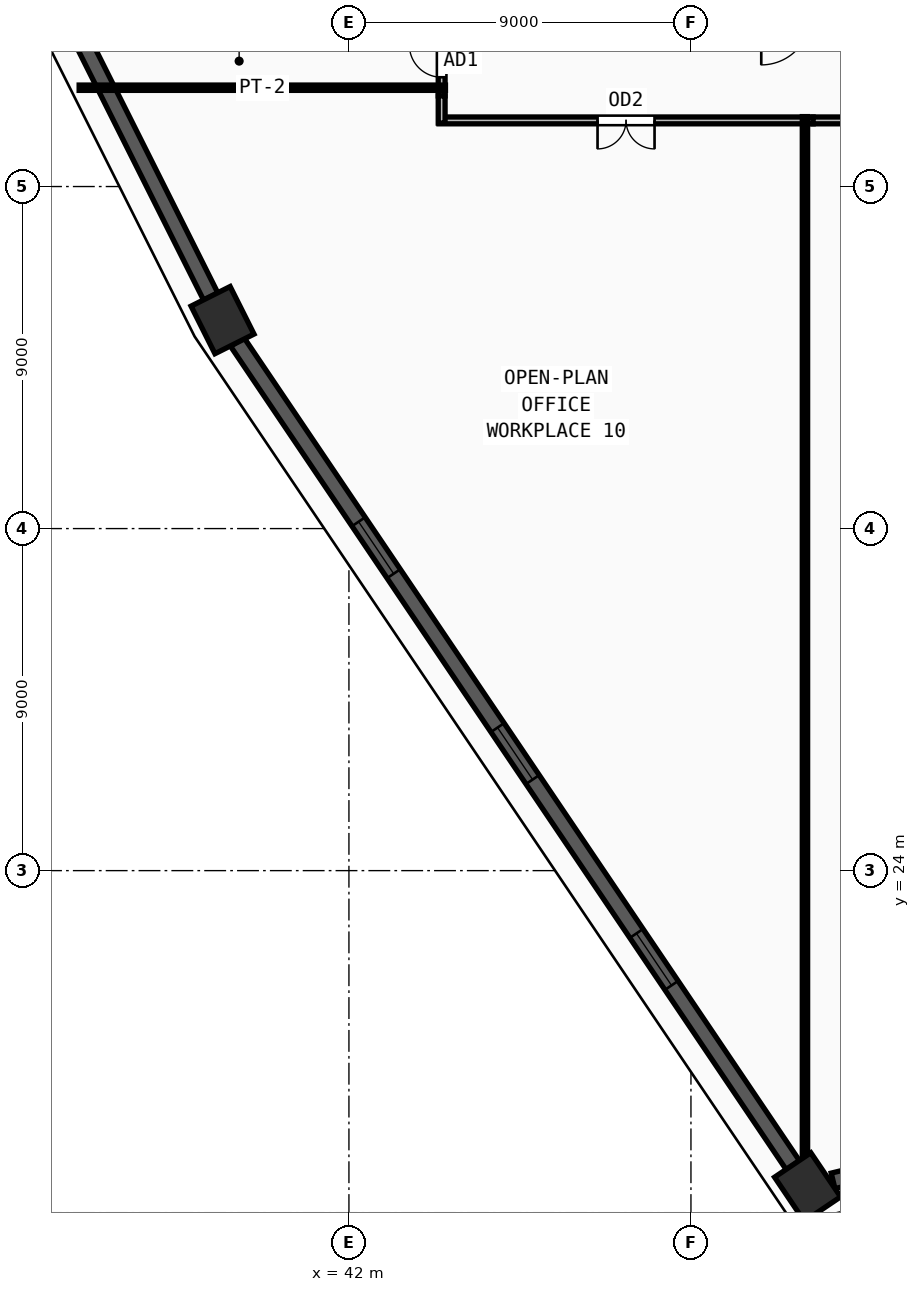
"""IFC4 building model, lengths in metres.
Left out: names, types, materials, properties, quantities, classifications, styles, units other than length and angle.
Written with IfcOpenShell. Run it as: python <this file> out.ifc"""

import sys

from ifc_helpers import new_model, si_unit, direction, frame, frame_2d, origin, origin_2d, place, context, subcontext, project, spatial, rectangle, extrude, source, transform, mapped, element, fill, save


model = new_model("IFC4")
c1 = context("Model", 3, precision=1e-05, world=origin(), true_north=direction((0.0, 1.0)))
c2 = subcontext(c1, "Body", "Model", "MODEL_VIEW")
j1 = project(units=[si_unit("LENGTHUNIT", "METRE"), si_unit("PLANEANGLEUNIT", "RADIAN")], contexts=[c1])
p1 = place(None, origin())
s1 = spatial("IfcSite", under=j1, at=p1, CompositionType="ELEMENT")
p2 = place(p1, origin())
s2 = spatial("IfcBuilding", under=s1, at=p2, CompositionType="ELEMENT")
p3 = place(p2, frame((0.0, 0.0, 124.5)))
s3 = spatial("IfcBuildingStorey", under=s2, at=p3, CompositionType="ELEMENT", Elevation=124.5)
m1 = source(origin(), c2, "Body", "SweptSolid", [
    extrude(rectangle(XDim=1.4, YDim=1.15, at=origin_2d()), origin(), (0.0, 0.0, 1.0), 3.75),
])
for number, where, z_axis, x_axis in (
    (1, (54.069, 15.675, 0.0), (0.0, 0.0, 1.0), (-0.559, 0.829, 0.0)),
    (2, (38.674, 38.485, 0.0), (0.0, 0.0, 1.0), (-0.449, 0.894, 0.0)),
):
    element("IfcColumn", number, at=place(p3, frame(where, z_axis=z_axis, x_axis=x_axis)), inside=s3, PredefinedType="COLUMN", context=c2, shape_type="MappedRepresentation", body=[
        mapped(m1, transform((0.0, 0.0, 0.0), x_axis=(1.0, 0.0, 0.0), y_axis=(0.0, 1.0, 0.0), z_axis=(0.0, 0.0, 1.0), scale=1.0)),
    ])
p4 = place(p3, frame((24.158, 67.415, 0.0), z_axis=(0.0, 0.0, 1.0), x_axis=(0.448489429893, -0.893788135564, 0.0)))
e3 = element("IfcWall", 3, at=p4, inside=s3, PredefinedType="SOLIDWALL", context=c2, shape_type="SweptSolid", body=[
    extrude(rectangle(XDim=31.677, YDim=0.42, at=frame_2d((15.839, 0.0))), origin(), (0.0, 0.0, 1.0), 3.57),
])
m2 = source(origin(), c2, "Body", "SweptSolid", [
    extrude(rectangle(XDim=1.65, YDim=1.95, at=frame_2d((0.825, 0.975))), frame((0.0, 0.22, 0.0), z_axis=(0.0, -1.0, 0.0), x_axis=(1.0, 0.0, 0.0)), (0.0, 0.0, 1.0), 0.44),
])
p5 = place(p4, frame((7.094, 0.0, 0.55)))
e4 = element("IfcOpeningElement", 4, at=p5, cuts=e3, PredefinedType="OPENING", context=c2, shape_type="MappedRepresentation", body=[
    mapped(m2, transform((0.0, 0.0, 0.0), x_axis=(1.0, 0.0, 0.0), y_axis=(0.0, 1.0, 0.0), z_axis=(0.0, 0.0, 1.0), scale=1.0)),
])
p6 = place(p4, frame((16.564, 0.0, 0.55)))
e5 = element("IfcOpeningElement", 5, at=p6, cuts=e3, PredefinedType="OPENING", context=c2, shape_type="MappedRepresentation", body=[
    mapped(m2, transform((0.0, 0.0, 0.0), x_axis=(1.0, 0.0, 0.0), y_axis=(0.0, 1.0, 0.0), z_axis=(0.0, 0.0, 1.0), scale=1.0)),
])
p7 = place(p4, frame((21.383, 0.0, 0.55)))
e6 = element("IfcOpeningElement", 6, at=p7, cuts=e3, PredefinedType="OPENING", context=c2, shape_type="MappedRepresentation", body=[
    mapped(m2, transform((0.0, 0.0, 0.0), x_axis=(1.0, 0.0, 0.0), y_axis=(0.0, 1.0, 0.0), z_axis=(0.0, 0.0, 1.0), scale=1.0)),
])
p8 = place(p3, frame((39.06, 37.913, 0.0), z_axis=(0.0, 0.0, 1.0), x_axis=(0.559433071817, -0.828875526335, 0.0)))
e7 = element("IfcWall", 7, at=p8, inside=s3, PredefinedType="SOLIDWALL", context=c2, shape_type="SweptSolid", body=[
    extrude(rectangle(XDim=26.139, YDim=0.42, at=frame_2d((13.07, 0.0))), origin(), (0.0, 0.0, 1.0), 3.57),
])
p9 = place(p8, frame((5.71, 0.0, 0.55)))
e8 = element("IfcOpeningElement", 8, at=p9, cuts=e7, PredefinedType="OPENING", context=c2, shape_type="MappedRepresentation", body=[
    mapped(m2, transform((0.0, 0.0, 0.0), x_axis=(1.0, 0.0, 0.0), y_axis=(0.0, 1.0, 0.0), z_axis=(0.0, 0.0, 1.0), scale=1.0)),
])
p10 = place(p8, frame((12.245, 0.0, 0.55)))
e9 = element("IfcOpeningElement", 9, at=p10, cuts=e7, PredefinedType="OPENING", context=c2, shape_type="MappedRepresentation", body=[
    mapped(m2, transform((0.0, 0.0, 0.0), x_axis=(1.0, 0.0, 0.0), y_axis=(0.0, 1.0, 0.0), z_axis=(0.0, 0.0, 1.0), scale=1.0)),
])
p11 = place(p8, frame((18.779, 0.0, 0.55)))
e10 = element("IfcOpeningElement", 10, at=p11, cuts=e7, PredefinedType="OPENING", context=c2, shape_type="MappedRepresentation", body=[
    mapped(m2, transform((0.0, 0.0, 0.0), x_axis=(1.0, 0.0, 0.0), y_axis=(0.0, 1.0, 0.0), z_axis=(0.0, 0.0, 1.0), scale=1.0)),
])
p12 = place(p3, frame((54.74, 15.837, 0.0), z_axis=(0.0, 0.0, 1.0), x_axis=(0.972061054332, 0.234728154791, 0.0)))
e11 = element("IfcWall", 11, at=p12, inside=s3, PredefinedType="SOLIDWALL", context=c2, shape_type="SweptSolid", body=[
    extrude(rectangle(XDim=4.721, YDim=0.42, at=frame_2d((2.36, 0.0))), origin(), (0.0, 0.0, 1.0), 3.57),
])
m3 = source(origin(), c2, "Body", "SweptSolid", [
    extrude(rectangle(XDim=1.2, YDim=1.9, at=frame_2d((0.6, 0.95))), frame((0.0, 0.22, 0.0), z_axis=(0.0, -1.0, 0.0), x_axis=(1.0, 0.0, 0.0)), (0.0, 0.0, 1.0), 0.44),
])
p13 = place(p12, frame((1.76, 0.0, 0.55)))
e12 = element("IfcOpeningElement", 12, at=p13, cuts=e11, PredefinedType="OPENING", context=c2, shape_type="MappedRepresentation", body=[
    mapped(m3, transform((0.0, 0.0, 0.0), x_axis=(1.0, 0.0, 0.0), y_axis=(0.0, 1.0, 0.0), z_axis=(0.0, 0.0, 1.0), scale=1.0)),
])
p14 = place(p3, frame((44.44, 44.385, 0.0), z_axis=(0.0, 0.0, 1.0), x_axis=(0.0, 1.0, 0.0)))
e13 = element("IfcWall", 13, at=p14, inside=s3, PredefinedType="PARTITIONING", context=c2, shape_type="SweptSolid", body=[
    extrude(rectangle(XDim=1.83, YDim=0.18, at=frame_2d((0.915, 0.0))), origin(), (0.0, 0.0, 1.0), 3.57),
])
m4 = source(origin(), c2, "Body", "SweptSolid", [
    extrude(rectangle(XDim=0.85, YDim=2.1, at=frame_2d((0.425, 1.05))), frame((0.0, 0.1, 0.0), z_axis=(0.0, -1.0, 0.0), x_axis=(1.0, 0.0, 0.0)), (0.0, 0.0, 1.0), 0.2),
])
p15 = place(p14, frame((0.49, 0.0, 0.0)))
e14 = element("IfcOpeningElement", 14, at=p15, cuts=e13, PredefinedType="OPENING", context=c2, shape_type="MappedRepresentation", body=[
    mapped(m4, transform((0.0, 0.0, 0.0), x_axis=(1.0, 0.0, 0.0), y_axis=(0.0, 1.0, 0.0), z_axis=(0.0, 0.0, 1.0), scale=1.0)),
])
p16 = place(p3, frame((54.215, 43.74, 0.0), z_axis=(0.0, 0.0, 1.0), x_axis=(-1.0, 0.0, 0.0)))
e15 = element("IfcWall", 15, at=p16, inside=s3, PredefinedType="PARTITIONING", context=c2, shape_type="SweptSolid", body=[
    extrude(rectangle(XDim=9.845, YDim=0.18, at=frame_2d((4.922, 0.0))), origin(), (0.0, 0.0, 1.0), 3.57),
])
m5 = source(origin(), c2, "Body", "SweptSolid", [
    extrude(rectangle(XDim=1.5, YDim=2.2, at=frame_2d((0.75, 1.1))), frame((0.0, 0.1, 0.0), z_axis=(0.0, -1.0, 0.0), x_axis=(1.0, 0.0, 0.0)), (0.0, 0.0, 1.0), 0.2),
])
p17 = place(p16, frame((4.173, 0.0, 0.0)))
e16 = element("IfcOpeningElement", 16, at=p17, cuts=e15, PredefinedType="OPENING", context=c2, shape_type="MappedRepresentation", body=[
    mapped(m5, transform((0.0, 0.0, 0.0), x_axis=(1.0, 0.0, 0.0), y_axis=(0.0, 1.0, 0.0), z_axis=(0.0, 0.0, 1.0), scale=1.0)),
])
p18 = place(p3, frame((65.215, 43.74, 0.0), z_axis=(0.0, 0.0, 1.0), x_axis=(-1.0, 0.0, 0.0)))
e17 = element("IfcWall", 17, at=p18, inside=s3, PredefinedType="PARTITIONING", context=c2, shape_type="SweptSolid", body=[
    extrude(rectangle(XDim=11.0, YDim=0.18, at=frame_2d((5.5, 0.0))), origin(), (0.0, 0.0, 1.0), 3.57),
])
p19 = place(p18, frame((9.275, 0.0, 0.0)))
e18 = element("IfcOpeningElement", 18, at=p19, cuts=e17, PredefinedType="OPENING", context=c2, shape_type="MappedRepresentation", body=[
    mapped(m4, transform((0.0, 0.0, 0.0), x_axis=(1.0, 0.0, 0.0), y_axis=(0.0, 1.0, 0.0), z_axis=(0.0, 0.0, 1.0), scale=1.0)),
])
p20 = place(p3, frame((44.44, 43.67, 0.0), z_axis=(0.0, 0.0, 1.0), x_axis=(0.0, 1.0, 0.0)))
e19 = element("IfcWall", 19, at=p20, inside=s3, PredefinedType="PARTITIONING", context=c2, shape_type="SweptSolid", body=[
    extrude(rectangle(XDim=0.715, YDim=0.18, at=frame_2d((0.357, 0.0))), origin(), (0.0, 0.0, 1.0), 3.57),
])
p21 = place(p3, frame((44.54, 44.6, 0.0), z_axis=(0.0, 0.0, 1.0), x_axis=(-1.0, 0.0, 0.0)))
e20 = element("IfcWall", 20, at=p21, inside=s3, PredefinedType="PARTITIONING", context=c2, shape_type="SweptSolid", body=[
    extrude(rectangle(XDim=9.639, YDim=0.14, at=frame_2d((4.82, 0.0))), origin(), (0.0, 0.0, 1.0), 3.57),
])
p22 = place(p3, frame((54.0, 43.84, 0.0), z_axis=(0.0, 0.0, 1.0), x_axis=(0.0, -1.0, 0.0)))
e21 = element("IfcWall", 21, at=p22, inside=s3, PredefinedType="PARTITIONING", context=c2, shape_type="SweptSolid", body=[
    extrude(rectangle(XDim=28.83, YDim=0.14, at=frame_2d((14.415, 0.0))), origin(), (0.0, 0.0, 1.0), 2.755),
])
m6 = source(origin(), c2, "Body", "SweptSolid", [
    extrude(rectangle(XDim=1.65, YDim=1.95, at=frame_2d((0.825, 0.975))), frame((0.0, 0.03, 0.0), z_axis=(0.0, -1.0, 0.0), x_axis=(1.0, 0.0, 0.0)), (0.0, 0.0, 1.0), 0.06),
])
p23 = place(p9, origin())
e22 = element("IfcWindow", 22, at=p23, inside=s3, PartitioningType="DOUBLE_PANEL_VERTICAL", PredefinedType="WINDOW", context=c2, shape_type="MappedRepresentation", body=[
    mapped(m6, transform((0.0, 0.0, 0.0), x_axis=(1.0, 0.0, 0.0), y_axis=(0.0, 1.0, 0.0), z_axis=(0.0, 0.0, 1.0), scale=1.0)),
])
fill(e8, e22)
p24 = place(p10, origin())
e23 = element("IfcWindow", 23, at=p24, inside=s3, PartitioningType="DOUBLE_PANEL_VERTICAL", PredefinedType="WINDOW", context=c2, shape_type="MappedRepresentation", body=[
    mapped(m6, transform((0.0, 0.0, 0.0), x_axis=(1.0, 0.0, 0.0), y_axis=(0.0, 1.0, 0.0), z_axis=(0.0, 0.0, 1.0), scale=1.0)),
])
fill(e9, e23)
p25 = place(p11, origin())
e24 = element("IfcWindow", 24, at=p25, inside=s3, PartitioningType="DOUBLE_PANEL_VERTICAL", PredefinedType="WINDOW", context=c2, shape_type="MappedRepresentation", body=[
    mapped(m6, transform((0.0, 0.0, 0.0), x_axis=(1.0, 0.0, 0.0), y_axis=(0.0, 1.0, 0.0), z_axis=(0.0, 0.0, 1.0), scale=1.0)),
])
fill(e10, e24)
m7 = source(origin(), c2, "Body", "SweptSolid", [
    extrude(rectangle(XDim=0.85, YDim=2.1, at=frame_2d((0.425, 1.05))), frame((0.0, 0.025, 0.0), z_axis=(0.0, -1.0, 0.0), x_axis=(1.0, 0.0, 0.0)), (0.0, 0.0, 1.0), 0.05),
])
p26 = place(p15, origin())
e25 = element("IfcDoor", 25, at=p26, inside=s3, OperationType="SINGLE_SWING_RIGHT", PredefinedType="DOOR", context=c2, shape_type="MappedRepresentation", body=[
    mapped(m7, transform((0.0, 0.0, 0.0), x_axis=(1.0, 0.0, 0.0), y_axis=(0.0, 1.0, 0.0), z_axis=(0.0, 0.0, 1.0), scale=1.0)),
])
fill(e14, e25)
m8 = source(origin(), c2, "Body", "SweptSolid", [
    extrude(rectangle(XDim=1.5, YDim=2.2, at=frame_2d((0.75, 1.1))), frame((0.0, 0.025, 0.0), z_axis=(0.0, -1.0, 0.0), x_axis=(1.0, 0.0, 0.0)), (0.0, 0.0, 1.0), 0.05),
])
p27 = place(p17, origin())
e26 = element("IfcDoor", 26, at=p27, inside=s3, OperationType="DOUBLE_DOOR_SINGLE_SWING", PredefinedType="DOOR", context=c2, shape_type="MappedRepresentation", body=[
    mapped(m8, transform((0.0, 0.0, 0.0), x_axis=(1.0, 0.0, 0.0), y_axis=(0.0, 1.0, 0.0), z_axis=(0.0, 0.0, 1.0), scale=1.0)),
])
fill(e16, e26)
save(model, sys.argv[1])
